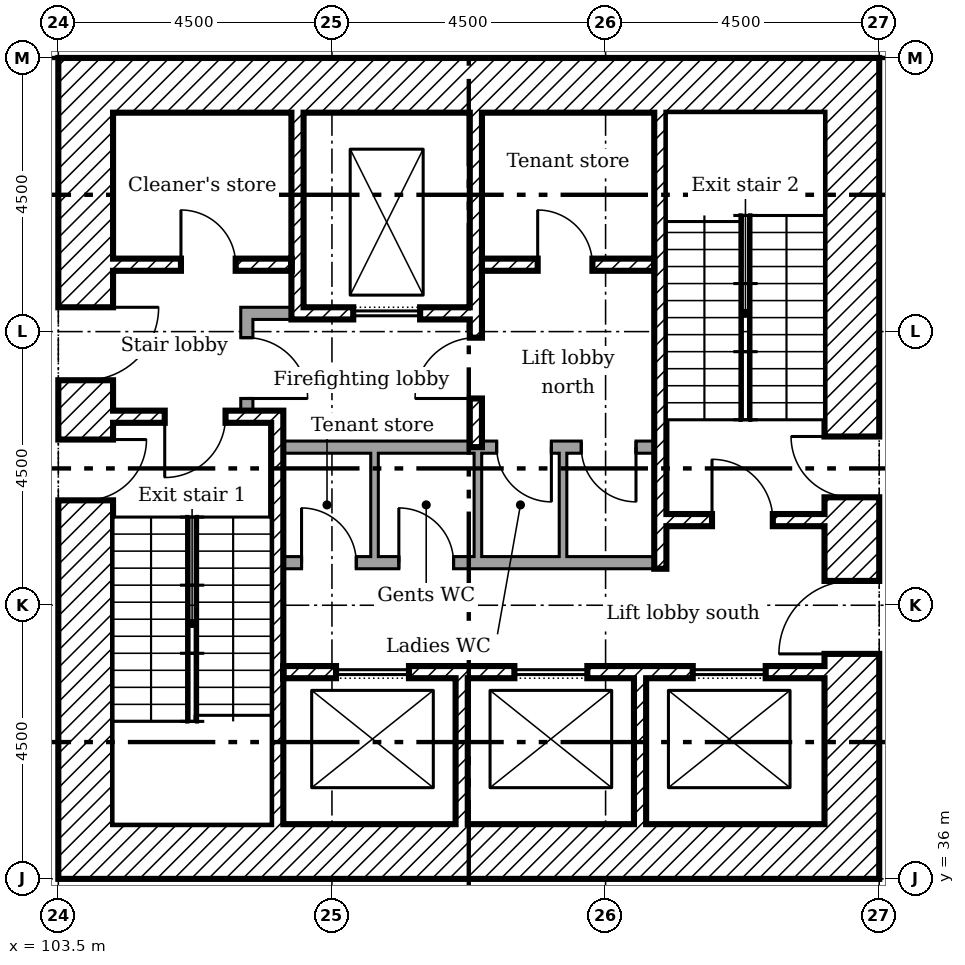
"""IFC4 building model, lengths in metres.
Left out: names, types, materials, properties, quantities, classifications, styles, units other than length and angle.
Written with IfcOpenShell. Run it as: python <this file> out.ifc"""

import sys

from ifc_helpers import new_model, si_unit, direction, frame, frame_2d, origin, place, context, subcontext, project, spatial, rectangle, extrude, element, fill, save


model = new_model("IFC4")
c1 = context("Model", 3, precision=1e-05, world=origin(), true_north=direction((0.0, 1.0)))
c2 = subcontext(c1, "Body", "Model", "MODEL_VIEW")
j1 = project(units=[si_unit("LENGTHUNIT", "METRE"), si_unit("PLANEANGLEUNIT", "RADIAN")], contexts=[c1])
p1 = place(None, origin())
s1 = spatial("IfcSite", under=j1, at=p1, CompositionType="ELEMENT")
p2 = place(p1, origin())
s2 = spatial("IfcBuilding", under=s1, at=p2, CompositionType="ELEMENT")
p3 = place(p2, frame((0.0, 0.0, 43.0)))
s3 = spatial("IfcBuildingStorey", under=s2, at=p3, CompositionType="ELEMENT", Elevation=43.0)
p4 = place(p3, frame((116.55, 36.0, 0.0), z_axis=(0.0, 0.0, 1.0), x_axis=(0.0, 1.0, 0.0)))
e1 = element("IfcWall", 1, at=p4, inside=s3, PredefinedType="SHEAR", context=c2, shape_type="SweptSolid", body=[
    extrude(rectangle(XDim=13.5, YDim=0.9, at=frame_2d((6.75, 0.0))), origin(), (0.0, 0.0, 1.0), 4.15),
])
p5 = place(p4, frame((3.7, 0.0, 0.0)))
e2 = element("IfcOpeningElement", 2, at=p5, cuts=e1, PredefinedType="OPENING", context=c2, shape_type="SweptSolid", body=[
    extrude(rectangle(XDim=1.2, YDim=2.1, at=frame_2d((0.6, 1.05))), frame((0.0, 0.46, 0.0), z_axis=(0.0, -1.0, 0.0), x_axis=(1.0, 0.0, 0.0)), (0.0, 0.0, 1.0), 0.92),
])
p6 = place(p4, frame((6.275, 0.0, 0.0)))
e3 = element("IfcOpeningElement", 3, at=p6, cuts=e1, PredefinedType="OPENING", context=c2, shape_type="SweptSolid", body=[
    extrude(rectangle(XDim=1.0, YDim=2.1, at=frame_2d((0.5, 1.05))), frame((0.0, 0.46, 0.0), z_axis=(0.0, -1.0, 0.0), x_axis=(1.0, 0.0, 0.0)), (0.0, 0.0, 1.0), 0.92),
])
for number, where in (
    (4, (104.4, 49.05, 0.0)),
    (5, (104.4, 36.45, 0.0)),
):
    element("IfcWall", number, at=place(p3, frame(where)), inside=s3, PredefinedType="SHEAR", context=c2, shape_type="SweptSolid", body=[
        extrude(rectangle(XDim=11.7, YDim=0.9, at=frame_2d((5.85, 0.0))), origin(), (0.0, 0.0, 1.0), 4.15),
    ])
p7 = place(p3, frame((103.95, 36.0, 0.0), z_axis=(0.0, 0.0, 1.0), x_axis=(0.0, 1.0, 0.0)))
e6 = element("IfcWall", 6, at=p7, inside=s3, PredefinedType="SHEAR", context=c2, shape_type="SweptSolid", body=[
    extrude(rectangle(XDim=13.5, YDim=0.9, at=frame_2d((6.75, 0.0))), origin(), (0.0, 0.0, 1.0), 4.15),
])
p8 = place(p7, frame((8.2, 0.0, 0.0)))
e7 = element("IfcOpeningElement", 7, at=p8, cuts=e6, PredefinedType="OPENING", context=c2, shape_type="SweptSolid", body=[
    extrude(rectangle(XDim=1.2, YDim=2.1, at=frame_2d((0.6, 1.05))), frame((0.0, 0.46, 0.0), z_axis=(0.0, -1.0, 0.0), x_axis=(1.0, 0.0, 0.0)), (0.0, 0.0, 1.0), 0.92),
])
p9 = place(p7, frame((6.225, 0.0, 0.0)))
e8 = element("IfcOpeningElement", 8, at=p9, cuts=e6, PredefinedType="OPENING", context=c2, shape_type="SweptSolid", body=[
    extrude(rectangle(XDim=1.0, YDim=2.1, at=frame_2d((0.5, 1.05))), frame((0.0, 0.46, 0.0), z_axis=(0.0, -1.0, 0.0), x_axis=(1.0, 0.0, 0.0)), (0.0, 0.0, 1.0), 0.92),
])
p10 = place(p3, frame((107.433, 48.6, 0.0), z_axis=(0.0, 0.0, 1.0), x_axis=(0.0, -1.0, 0.0)))
e9 = element("IfcWall", 9, at=p10, inside=s3, PredefinedType="SHEAR", context=c2, shape_type="SweptSolid", body=[
    extrude(rectangle(XDim=3.4, YDim=0.2, at=frame_2d((1.7, 0.0))), origin(), (0.0, 0.0, 1.0), 4.15),
])
p11 = place(p3, frame((110.367, 48.6, 0.0), z_axis=(0.0, 0.0, 1.0), x_axis=(0.0, -1.0, 0.0)))
e10 = element("IfcWall", 10, at=p11, inside=s3, PredefinedType="SHEAR", context=c2, shape_type="SweptSolid", body=[
    extrude(rectangle(XDim=5.5, YDim=0.2, at=frame_2d((2.75, 0.0))), origin(), (0.0, 0.0, 1.0), 4.15),
])
p12 = place(p11, frame((3.7, 0.0, 0.0)))
e11 = element("IfcOpeningElement", 11, at=p12, cuts=e10, PredefinedType="OPENING", context=c2, shape_type="SweptSolid", body=[
    extrude(rectangle(XDim=1.0, YDim=2.1, at=frame_2d((0.5, 1.05))), frame((0.0, 0.11, 0.0), z_axis=(0.0, -1.0, 0.0), x_axis=(1.0, 0.0, 0.0)), (0.0, 0.0, 1.0), 0.22),
])
for number, where, z_axis, x_axis in (
    (12, (110.133, 36.9, 0.0), (0.0, 0.0, 1.0), (0.0, 1.0, 0.0)),
    (13, (113.067, 36.9, 0.0), (0.0, 0.0, 1.0), (0.0, 1.0, 0.0)),
):
    element("IfcWall", number, at=place(p3, frame(where, z_axis=z_axis, x_axis=x_axis)), inside=s3, PredefinedType="SHEAR", context=c2, shape_type="SweptSolid", body=[
        extrude(rectangle(XDim=2.4, YDim=0.2, at=frame_2d((1.2, 0.0))), origin(), (0.0, 0.0, 1.0), 4.15),
    ])
p13 = place(p3, frame((106.5, 45.3, 0.0)))
e14 = element("IfcWall", 14, at=p13, inside=s3, PredefinedType="PARTITIONING", context=c2, shape_type="SweptSolid", body=[
    extrude(rectangle(XDim=0.833, YDim=0.2, at=frame_2d((0.417, 0.0))), origin(), (0.0, 0.0, 1.0), 4.15),
])
p14 = place(p3, frame((106.6, 43.7, 0.0), z_axis=(0.0, 0.0, 1.0), x_axis=(0.0, 1.0, 0.0)))
e15 = element("IfcWall", 15, at=p14, inside=s3, PredefinedType="PARTITIONING", context=c2, shape_type="SweptSolid", body=[
    extrude(rectangle(XDim=1.5, YDim=0.2, at=frame_2d((0.75, 0.0))), origin(), (0.0, 0.0, 1.0), 4.15),
])
p15 = place(p14, frame((0.2, 0.0, 0.0)))
e16 = element("IfcOpeningElement", 16, at=p15, cuts=e15, PredefinedType="OPENING", context=c2, shape_type="SweptSolid", body=[
    extrude(rectangle(XDim=1.0, YDim=2.1, at=frame_2d((0.5, 1.05))), frame((0.0, 0.11, 0.0), z_axis=(0.0, -1.0, 0.0), x_axis=(1.0, 0.0, 0.0)), (0.0, 0.0, 1.0), 0.22),
])
p16 = place(p3, frame((104.4, 46.1, 0.0)))
e17 = element("IfcWall", 17, at=p16, inside=s3, PredefinedType="SHEAR", context=c2, shape_type="SweptSolid", body=[
    extrude(rectangle(XDim=2.933, YDim=0.2, at=frame_2d((1.467, 0.0))), origin(), (0.0, 0.0, 1.0), 4.15),
])
p17 = place(p16, frame((1.117, 0.0, 0.0)))
e18 = element("IfcOpeningElement", 18, at=p17, cuts=e17, PredefinedType="OPENING", context=c2, shape_type="SweptSolid", body=[
    extrude(rectangle(XDim=0.9, YDim=2.1, at=frame_2d((0.45, 1.05))), frame((0.0, 0.11, 0.0), z_axis=(0.0, -1.0, 0.0), x_axis=(1.0, 0.0, 0.0)), (0.0, 0.0, 1.0), 0.22),
])
p18 = place(p3, frame((110.467, 46.1, 0.0)))
e19 = element("IfcWall", 19, at=p18, inside=s3, PredefinedType="SHEAR", context=c2, shape_type="SweptSolid", body=[
    extrude(rectangle(XDim=2.833, YDim=0.2, at=frame_2d((1.417, 0.0))), origin(), (0.0, 0.0, 1.0), 4.15),
])
p19 = place(p18, frame((0.917, 0.0, 0.0)))
e20 = element("IfcOpeningElement", 20, at=p19, cuts=e19, PredefinedType="OPENING", context=c2, shape_type="SweptSolid", body=[
    extrude(rectangle(XDim=0.9, YDim=2.1, at=frame_2d((0.45, 1.05))), frame((0.0, 0.11, 0.0), z_axis=(0.0, -1.0, 0.0), x_axis=(1.0, 0.0, 0.0)), (0.0, 0.0, 1.0), 0.22),
])
p20 = place(p3, frame((107.533, 45.3, 0.0)))
e21 = element("IfcWall", 21, at=p20, inside=s3, PredefinedType="SHEAR", context=c2, shape_type="SweptSolid", body=[
    extrude(rectangle(XDim=2.733, YDim=0.2, at=frame_2d((1.367, 0.0))), origin(), (0.0, 0.0, 1.0), 4.15),
])
p21 = place(p20, frame((0.817, 0.0, 0.0)))
e22 = element("IfcOpeningElement", 22, at=p21, cuts=e21, PredefinedType="OPENING", context=c2, shape_type="SweptSolid", body=[
    extrude(rectangle(XDim=1.1, YDim=2.1, at=frame_2d((0.55, 1.05))), frame((0.0, 0.11, 0.0), z_axis=(0.0, -1.0, 0.0), x_axis=(1.0, 0.0, 0.0)), (0.0, 0.0, 1.0), 0.22),
])
p22 = place(p3, frame((107.2, 39.4, 0.0)))
e23 = element("IfcWall", 23, at=p22, inside=s3, PredefinedType="SHEAR", context=c2, shape_type="SweptSolid", body=[
    extrude(rectangle(XDim=8.9, YDim=0.2, at=frame_2d((4.45, 0.0))), origin(), (0.0, 0.0, 1.0), 4.15),
])
p23 = place(p22, frame((0.867, 0.0, 0.0)))
e24 = element("IfcOpeningElement", 24, at=p23, cuts=e23, PredefinedType="OPENING", context=c2, shape_type="SweptSolid", body=[
    extrude(rectangle(XDim=1.2, YDim=2.1, at=frame_2d((0.6, 1.05))), frame((0.0, 0.11, 0.0), z_axis=(0.0, -1.0, 0.0), x_axis=(1.0, 0.0, 0.0)), (0.0, 0.0, 1.0), 0.22),
])
p24 = place(p22, frame((3.8, 0.0, 0.0)))
e25 = element("IfcOpeningElement", 25, at=p24, cuts=e23, PredefinedType="OPENING", context=c2, shape_type="SweptSolid", body=[
    extrude(rectangle(XDim=1.2, YDim=2.1, at=frame_2d((0.6, 1.05))), frame((0.0, 0.11, 0.0), z_axis=(0.0, -1.0, 0.0), x_axis=(1.0, 0.0, 0.0)), (0.0, 0.0, 1.0), 0.22),
])
p25 = place(p22, frame((6.733, 0.0, 0.0)))
e26 = element("IfcOpeningElement", 26, at=p25, cuts=e23, PredefinedType="OPENING", context=c2, shape_type="SweptSolid", body=[
    extrude(rectangle(XDim=1.2, YDim=2.1, at=frame_2d((0.6, 1.05))), frame((0.0, 0.11, 0.0), z_axis=(0.0, -1.0, 0.0), x_axis=(1.0, 0.0, 0.0)), (0.0, 0.0, 1.0), 0.22),
])
p26 = place(p3, frame((107.1, 36.9, 0.0), z_axis=(0.0, 0.0, 1.0), x_axis=(0.0, 1.0, 0.0)))
e27 = element("IfcWall", 27, at=p26, inside=s3, PredefinedType="SHEAR", context=c2, shape_type="SweptSolid", body=[
    extrude(rectangle(XDim=6.8, YDim=0.2, at=frame_2d((3.4, 0.0))), origin(), (0.0, 0.0, 1.0), 4.15),
])
p27 = place(p3, frame((104.4, 43.6, 0.0)))
e28 = element("IfcWall", 28, at=p27, inside=s3, PredefinedType="SHEAR", context=c2, shape_type="SweptSolid", body=[
    extrude(rectangle(XDim=2.6, YDim=0.2, at=frame_2d((1.3, 0.0))), origin(), (0.0, 0.0, 1.0), 4.15),
])
p28 = place(p27, frame((0.85, 0.0, 0.0)))
e29 = element("IfcOpeningElement", 29, at=p28, cuts=e28, PredefinedType="OPENING", context=c2, shape_type="SweptSolid", body=[
    extrude(rectangle(XDim=1.0, YDim=2.1, at=frame_2d((0.5, 1.05))), frame((0.0, 0.11, 0.0), z_axis=(0.0, -1.0, 0.0), x_axis=(1.0, 0.0, 0.0)), (0.0, 0.0, 1.0), 0.22),
])
p29 = place(p3, frame((113.5, 41.9, 0.0)))
e30 = element("IfcWall", 30, at=p29, inside=s3, PredefinedType="SHEAR", context=c2, shape_type="SweptSolid", body=[
    extrude(rectangle(XDim=2.6, YDim=0.2, at=frame_2d((1.3, 0.0))), origin(), (0.0, 0.0, 1.0), 4.15),
])
p30 = place(p29, frame((0.75, 0.0, 0.0)))
e31 = element("IfcOpeningElement", 31, at=p30, cuts=e30, PredefinedType="OPENING", context=c2, shape_type="SweptSolid", body=[
    extrude(rectangle(XDim=1.0, YDim=2.1, at=frame_2d((0.5, 1.05))), frame((0.0, 0.11, 0.0), z_axis=(0.0, -1.0, 0.0), x_axis=(1.0, 0.0, 0.0)), (0.0, 0.0, 1.0), 0.22),
])
p31 = place(p3, frame((113.4, 41.1, 0.0), z_axis=(0.0, 0.0, 1.0), x_axis=(0.0, 1.0, 0.0)))
e32 = element("IfcWall", 32, at=p31, inside=s3, PredefinedType="SHEAR", context=c2, shape_type="SweptSolid", body=[
    extrude(rectangle(XDim=7.5, YDim=0.2, at=frame_2d((3.75, 0.0))), origin(), (0.0, 0.0, 1.0), 4.15),
])
p32 = place(p3, frame((107.2, 43.1, 0.0)))
e33 = element("IfcWall", 33, at=p32, inside=s3, PredefinedType="PARTITIONING", context=c2, shape_type="SweptSolid", body=[
    extrude(rectangle(XDim=6.1, YDim=0.2, at=frame_2d((3.05, 0.0))), origin(), (0.0, 0.0, 1.0), 4.15),
])
p33 = place(p32, frame((3.509, 0.0, 0.0)))
e34 = element("IfcOpeningElement", 34, at=p33, cuts=e33, PredefinedType="OPENING", context=c2, shape_type="SweptSolid", body=[
    extrude(rectangle(XDim=0.9, YDim=2.1, at=frame_2d((0.45, 1.05))), frame((0.0, 0.11, 0.0), z_axis=(0.0, -1.0, 0.0), x_axis=(1.0, 0.0, 0.0)), (0.0, 0.0, 1.0), 0.22),
])
p34 = place(p32, frame((4.9, 0.0, 0.0)))
e35 = element("IfcOpeningElement", 35, at=p34, cuts=e33, PredefinedType="OPENING", context=c2, shape_type="SweptSolid", body=[
    extrude(rectangle(XDim=0.9, YDim=2.1, at=frame_2d((0.45, 1.05))), frame((0.0, 0.11, 0.0), z_axis=(0.0, -1.0, 0.0), x_axis=(1.0, 0.0, 0.0)), (0.0, 0.0, 1.0), 0.22),
])
p35 = place(p3, frame((107.2, 41.2, 0.0)))
e36 = element("IfcWall", 36, at=p35, inside=s3, PredefinedType="PARTITIONING", context=c2, shape_type="SweptSolid", body=[
    extrude(rectangle(XDim=6.1, YDim=0.2, at=frame_2d((3.05, 0.0))), origin(), (0.0, 0.0, 1.0), 4.15),
])
p36 = place(p35, frame((0.3, 0.0, 0.0)))
e37 = element("IfcOpeningElement", 37, at=p36, cuts=e36, PredefinedType="OPENING", context=c2, shape_type="SweptSolid", body=[
    extrude(rectangle(XDim=0.9, YDim=2.1, at=frame_2d((0.45, 1.05))), frame((0.0, 0.11, 0.0), z_axis=(0.0, -1.0, 0.0), x_axis=(1.0, 0.0, 0.0)), (0.0, 0.0, 1.0), 0.22),
])
p37 = place(p35, frame((1.9, 0.0, 0.0)))
e38 = element("IfcOpeningElement", 38, at=p37, cuts=e36, PredefinedType="OPENING", context=c2, shape_type="SweptSolid", body=[
    extrude(rectangle(XDim=0.9, YDim=2.1, at=frame_2d((0.45, 1.05))), frame((0.0, 0.11, 0.0), z_axis=(0.0, -1.0, 0.0), x_axis=(1.0, 0.0, 0.0)), (0.0, 0.0, 1.0), 0.22),
])
for number, where, z_axis, x_axis in (
    (39, (108.7, 41.3, 0.0), (0.0, 0.0, 1.0), (0.0, 1.0, 0.0)),
    (40, (110.4, 41.3, 0.0), (0.0, 0.0, 1.0), (0.0, 1.0, 0.0)),
    (41, (111.8, 41.3, 0.0), (0.0, 0.0, 1.0), (0.0, 1.0, 0.0)),
):
    element("IfcWall", number, at=place(p3, frame(where, z_axis=z_axis, x_axis=x_axis)), inside=s3, PredefinedType="PARTITIONING", context=c2, shape_type="SweptSolid", body=[
        extrude(rectangle(XDim=1.7, YDim=0.125, at=frame_2d((0.85, 0.0))), origin(), (0.0, 0.0, 1.0), 4.15),
    ])
p38 = place(p8, frame((1.2, 0.0, 0.0), x_axis=(-1.0, 0.0, 0.0)))
e42 = element("IfcDoor", 42, at=p38, inside=s3, OperationType="SINGLE_SWING_RIGHT", PredefinedType="DOOR", context=c2, shape_type="SweptSolid", body=[
    extrude(rectangle(XDim=1.2, YDim=2.1, at=frame_2d((0.6, 1.05))), frame((0.0, 0.025, 0.0), z_axis=(0.0, -1.0, 0.0), x_axis=(1.0, 0.0, 0.0)), (0.0, 0.0, 1.0), 0.05),
])
fill(e7, e42)
p39 = place(p5, origin())
e43 = element("IfcDoor", 43, at=p39, inside=s3, OperationType="SINGLE_SWING_RIGHT", PredefinedType="DOOR", context=c2, shape_type="SweptSolid", body=[
    extrude(rectangle(XDim=1.2, YDim=2.1, at=frame_2d((0.6, 1.05))), frame((0.0, 0.025, 0.0), z_axis=(0.0, -1.0, 0.0), x_axis=(1.0, 0.0, 0.0)), (0.0, 0.0, 1.0), 0.05),
])
fill(e2, e43)
p40 = place(p28, frame((1.0, 0.0, 0.0), x_axis=(-1.0, 0.0, 0.0)))
e44 = element("IfcDoor", 44, at=p40, inside=s3, OperationType="SINGLE_SWING_LEFT", PredefinedType="DOOR", context=c2, shape_type="SweptSolid", body=[
    extrude(rectangle(XDim=1.0, YDim=2.1, at=frame_2d((0.5, 1.05))), frame((0.0, 0.025, 0.0), z_axis=(0.0, -1.0, 0.0), x_axis=(1.0, 0.0, 0.0)), (0.0, 0.0, 1.0), 0.05),
])
fill(e29, e44)
p41 = place(p9, frame((1.0, 0.0, 0.0), x_axis=(-1.0, 0.0, 0.0)))
e45 = element("IfcDoor", 45, at=p41, inside=s3, OperationType="SINGLE_SWING_RIGHT", PredefinedType="DOOR", context=c2, shape_type="SweptSolid", body=[
    extrude(rectangle(XDim=1.0, YDim=2.1, at=frame_2d((0.5, 1.05))), frame((0.0, 0.025, 0.0), z_axis=(0.0, -1.0, 0.0), x_axis=(1.0, 0.0, 0.0)), (0.0, 0.0, 1.0), 0.05),
])
fill(e8, e45)
p42 = place(p30, origin())
e46 = element("IfcDoor", 46, at=p42, inside=s3, OperationType="SINGLE_SWING_RIGHT", PredefinedType="DOOR", context=c2, shape_type="SweptSolid", body=[
    extrude(rectangle(XDim=1.0, YDim=2.1, at=frame_2d((0.5, 1.05))), frame((0.0, 0.025, 0.0), z_axis=(0.0, -1.0, 0.0), x_axis=(1.0, 0.0, 0.0)), (0.0, 0.0, 1.0), 0.05),
])
fill(e31, e46)
p43 = place(p6, origin())
e47 = element("IfcDoor", 47, at=p43, inside=s3, OperationType="SINGLE_SWING_LEFT", PredefinedType="DOOR", context=c2, shape_type="SweptSolid", body=[
    extrude(rectangle(XDim=1.0, YDim=2.1, at=frame_2d((0.5, 1.05))), frame((0.0, 0.025, 0.0), z_axis=(0.0, -1.0, 0.0), x_axis=(1.0, 0.0, 0.0)), (0.0, 0.0, 1.0), 0.05),
])
fill(e3, e47)
p44 = place(p12, frame((1.0, 0.0, 0.0), x_axis=(-1.0, 0.0, 0.0)))
e48 = element("IfcDoor", 48, at=p44, inside=s3, OperationType="SINGLE_SWING_RIGHT", PredefinedType="DOOR", context=c2, shape_type="SweptSolid", body=[
    extrude(rectangle(XDim=1.0, YDim=2.1, at=frame_2d((0.5, 1.05))), frame((0.0, 0.025, 0.0), z_axis=(0.0, -1.0, 0.0), x_axis=(1.0, 0.0, 0.0)), (0.0, 0.0, 1.0), 0.05),
])
fill(e11, e48)
p45 = place(p15, frame((1.0, 0.0, 0.0), x_axis=(-1.0, 0.0, 0.0)))
e49 = element("IfcDoor", 49, at=p45, inside=s3, OperationType="SINGLE_SWING_LEFT", PredefinedType="DOOR", context=c2, shape_type="SweptSolid", body=[
    extrude(rectangle(XDim=1.0, YDim=2.1, at=frame_2d((0.5, 1.05))), frame((0.0, 0.025, 0.0), z_axis=(0.0, -1.0, 0.0), x_axis=(1.0, 0.0, 0.0)), (0.0, 0.0, 1.0), 0.05),
])
fill(e16, e49)
p46 = place(p17, origin())
e50 = element("IfcDoor", 50, at=p46, inside=s3, OperationType="SINGLE_SWING_RIGHT", PredefinedType="DOOR", context=c2, shape_type="SweptSolid", body=[
    extrude(rectangle(XDim=0.9, YDim=2.1, at=frame_2d((0.45, 1.05))), frame((0.0, 0.025, 0.0), z_axis=(0.0, -1.0, 0.0), x_axis=(1.0, 0.0, 0.0)), (0.0, 0.0, 1.0), 0.05),
])
fill(e18, e50)
p47 = place(p19, origin())
e51 = element("IfcDoor", 51, at=p47, inside=s3, OperationType="SINGLE_SWING_RIGHT", PredefinedType="DOOR", context=c2, shape_type="SweptSolid", body=[
    extrude(rectangle(XDim=0.9, YDim=2.1, at=frame_2d((0.45, 1.05))), frame((0.0, 0.025, 0.0), z_axis=(0.0, -1.0, 0.0), x_axis=(1.0, 0.0, 0.0)), (0.0, 0.0, 1.0), 0.05),
])
fill(e20, e51)
p48 = place(p36, origin())
e52 = element("IfcDoor", 52, at=p48, inside=s3, OperationType="SINGLE_SWING_RIGHT", PredefinedType="DOOR", context=c2, shape_type="SweptSolid", body=[
    extrude(rectangle(XDim=0.9, YDim=2.1, at=frame_2d((0.45, 1.05))), frame((0.0, 0.025, 0.0), z_axis=(0.0, -1.0, 0.0), x_axis=(1.0, 0.0, 0.0)), (0.0, 0.0, 1.0), 0.05),
])
fill(e37, e52)
p49 = place(p37, origin())
e53 = element("IfcDoor", 53, at=p49, inside=s3, OperationType="SINGLE_SWING_RIGHT", PredefinedType="DOOR", context=c2, shape_type="SweptSolid", body=[
    extrude(rectangle(XDim=0.9, YDim=2.1, at=frame_2d((0.45, 1.05))), frame((0.0, 0.025, 0.0), z_axis=(0.0, -1.0, 0.0), x_axis=(1.0, 0.0, 0.0)), (0.0, 0.0, 1.0), 0.05),
])
fill(e38, e53)
p50 = place(p33, frame((0.9, 0.0, 0.0), x_axis=(-1.0, 0.0, 0.0)))
e54 = element("IfcDoor", 54, at=p50, inside=s3, OperationType="SINGLE_SWING_RIGHT", PredefinedType="DOOR", context=c2, shape_type="SweptSolid", body=[
    extrude(rectangle(XDim=0.9, YDim=2.1, at=frame_2d((0.45, 1.05))), frame((0.0, 0.025, 0.0), z_axis=(0.0, -1.0, 0.0), x_axis=(1.0, 0.0, 0.0)), (0.0, 0.0, 1.0), 0.05),
])
fill(e34, e54)
p51 = place(p34, frame((0.9, 0.0, 0.0), x_axis=(-1.0, 0.0, 0.0)))
e55 = element("IfcDoor", 55, at=p51, inside=s3, OperationType="SINGLE_SWING_RIGHT", PredefinedType="DOOR", context=c2, shape_type="SweptSolid", body=[
    extrude(rectangle(XDim=0.9, YDim=2.1, at=frame_2d((0.45, 1.05))), frame((0.0, 0.025, 0.0), z_axis=(0.0, -1.0, 0.0), x_axis=(1.0, 0.0, 0.0)), (0.0, 0.0, 1.0), 0.05),
])
fill(e35, e55)
p52 = place(p21, origin())
e56 = element("IfcDoor", 56, at=p52, inside=s3, OperationType="SLIDING_TO_LEFT", PredefinedType="DOOR", context=c2, shape_type="SweptSolid", body=[
    extrude(rectangle(XDim=1.1, YDim=2.1, at=frame_2d((0.55, 1.05))), frame((0.0, 0.025, 0.0), z_axis=(0.0, -1.0, 0.0), x_axis=(1.0, 0.0, 0.0)), (0.0, 0.0, 1.0), 0.05),
])
fill(e22, e56)
p53 = place(p23, origin())
e57 = element("IfcDoor", 57, at=p53, inside=s3, OperationType="SLIDING_TO_LEFT", PredefinedType="DOOR", context=c2, shape_type="SweptSolid", body=[
    extrude(rectangle(XDim=1.2, YDim=2.1, at=frame_2d((0.6, 1.05))), frame((0.0, 0.025, 0.0), z_axis=(0.0, -1.0, 0.0), x_axis=(1.0, 0.0, 0.0)), (0.0, 0.0, 1.0), 0.05),
])
fill(e24, e57)
p54 = place(p24, origin())
e58 = element("IfcDoor", 58, at=p54, inside=s3, OperationType="SLIDING_TO_LEFT", PredefinedType="DOOR", context=c2, shape_type="SweptSolid", body=[
    extrude(rectangle(XDim=1.2, YDim=2.1, at=frame_2d((0.6, 1.05))), frame((0.0, 0.025, 0.0), z_axis=(0.0, -1.0, 0.0), x_axis=(1.0, 0.0, 0.0)), (0.0, 0.0, 1.0), 0.05),
])
fill(e25, e58)
p55 = place(p25, origin())
e59 = element("IfcDoor", 59, at=p55, inside=s3, OperationType="SLIDING_TO_LEFT", PredefinedType="DOOR", context=c2, shape_type="SweptSolid", body=[
    extrude(rectangle(XDim=1.2, YDim=2.1, at=frame_2d((0.6, 1.05))), frame((0.0, 0.025, 0.0), z_axis=(0.0, -1.0, 0.0), x_axis=(1.0, 0.0, 0.0)), (0.0, 0.0, 1.0), 0.05),
])
fill(e26, e59)
save(model, sys.argv[1])
